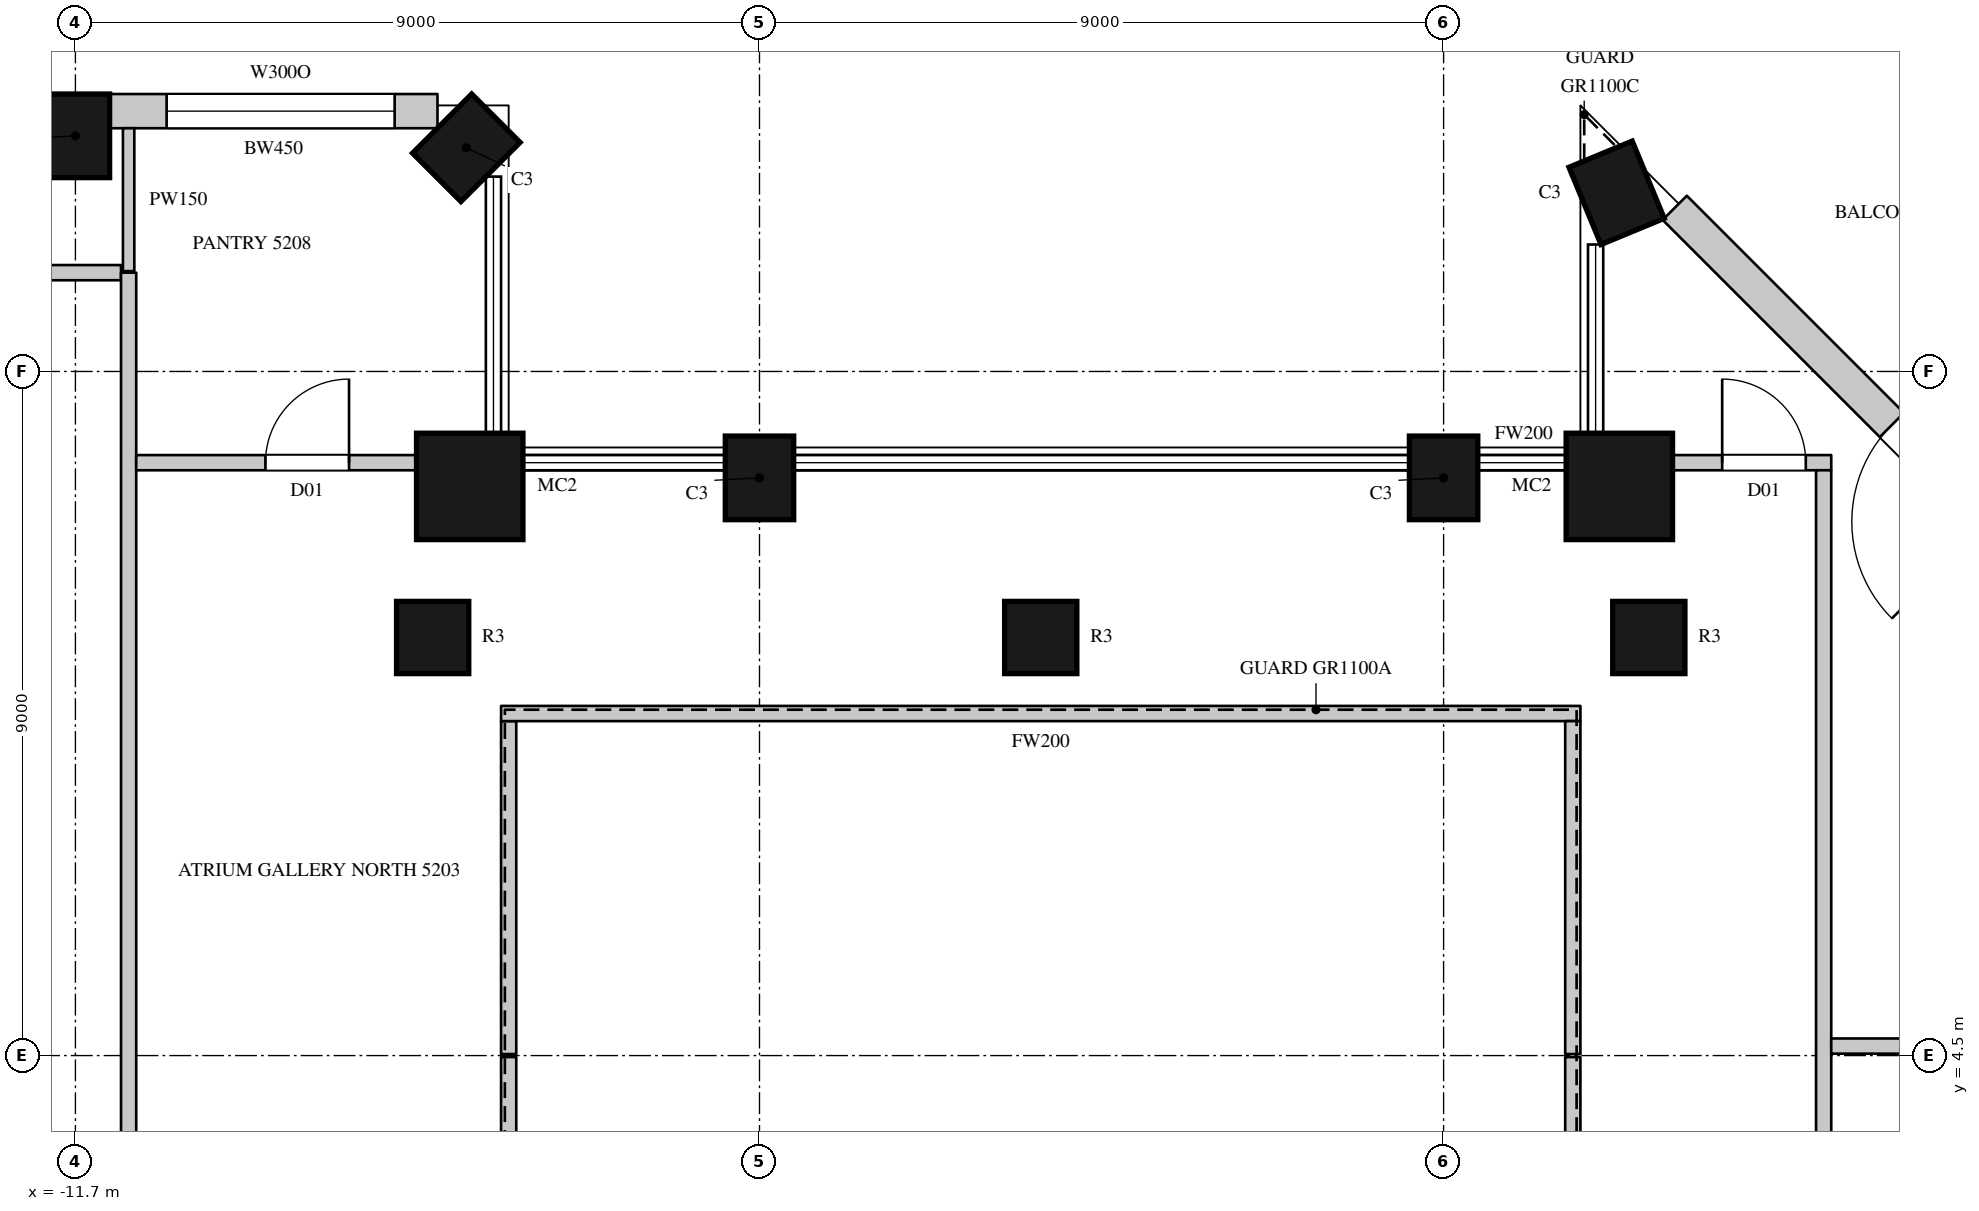
"""IFC4 building model, lengths in metres.
Left out: names, types, materials, properties, quantities, classifications, styles, units other than length and angle.
Written with IfcOpenShell. Run it as: python <this file> out.ifc"""

import sys

from ifc_helpers import new_model, si_unit, direction, frame, frame_2d, origin, origin_2d, place, context, subcontext, project, spatial, rectangle, circle, extrude, element, fill, save


model = new_model("IFC4")
c1 = context("Model", 3, precision=1e-05, world=origin(), true_north=direction((0.0, 1.0)))
c2 = subcontext(c1, "Body", "Model", "MODEL_VIEW")
j1 = project(units=[si_unit("LENGTHUNIT", "METRE"), si_unit("PLANEANGLEUNIT", "RADIAN")], contexts=[c1])
p1 = place(None, origin())
s1 = spatial("IfcSite", under=j1, at=p1, CompositionType="ELEMENT")
p2 = place(p1, origin())
s2 = spatial("IfcBuilding", under=s1, at=p2, CompositionType="ELEMENT")
p3 = place(p2, frame((0.0, 0.0, 234.3)))
s3 = spatial("IfcBuildingStorey", under=s2, at=p3, CompositionType="ELEMENT", Elevation=234.3)
p4 = place(p3, frame((8.576, 15.85, 0.0), z_axis=(0.0, 0.0, 1.0), x_axis=(-0.923879672772, -0.382683093746, 0.0)))
e1 = element("IfcColumn", 1, at=p4, inside=s3, PredefinedType="COLUMN", context=c2, shape_type="SweptSolid", body=[
    extrude(rectangle(XDim=0.9, YDim=1.1, at=origin_2d()), origin(), (0.0, 0.0, 1.0), 4.1),
])
p5 = place(p3, frame((8.612, 11.988, 0.0), z_axis=(0.0, 0.0, 1.0), x_axis=(1.0, 0.0, 0.0)))
e2 = element("IfcColumn", 2, at=p5, inside=s3, PredefinedType="COLUMN", context=c2, shape_type="SweptSolid", body=[
    extrude(circle(Radius=0.7, at=origin_2d()), origin(), (0.0, 0.0, 1.0), 4.1),
])
for number, where, z_axis, x_axis in (
    (3, (6.3, 12.1, 0.0), (0.0, 0.0, 1.0), (-1.0, 0.0, 0.0)),
    (4, (-2.7, 12.1, 0.0), (0.0, 0.0, 1.0), (-1.0, 0.0, 0.0)),
):
    element("IfcColumn", number, at=place(p3, frame(where, z_axis=z_axis, x_axis=x_axis)), inside=s3, PredefinedType="COLUMN", context=c2, shape_type="SweptSolid", body=[
        extrude(rectangle(XDim=0.9, YDim=1.1, at=origin_2d()), origin(), (0.0, 0.0, 1.0), 4.1),
    ])
p6 = place(p3, frame((-6.512, 11.988, 0.0), z_axis=(0.0, 0.0, 1.0), x_axis=(1.0, 0.0, 0.0)))
e5 = element("IfcColumn", 5, at=p6, inside=s3, PredefinedType="COLUMN", context=c2, shape_type="SweptSolid", body=[
    extrude(circle(Radius=0.7, at=origin_2d()), origin(), (0.0, 0.0, 1.0), 4.1),
])
for number, where, z_axis, x_axis in (
    (6, (-6.557, 16.443, 0.0), (0.0, 0.0, 1.0), (-0.707, 0.707, 0.0)),
    (7, (-11.7, 16.6, 0.0), (0.0, 0.0, 1.0), (-1.0, 0.0, 0.0)),
):
    element("IfcColumn", number, at=place(p3, frame(where, z_axis=z_axis, x_axis=x_axis)), inside=s3, PredefinedType="COLUMN", context=c2, shape_type="SweptSolid", body=[
        extrude(rectangle(XDim=0.9, YDim=1.1, at=origin_2d()), origin(), (0.0, 0.0, 1.0), 4.1),
    ])
for number, where, z_axis, x_axis in (
    (8, (-7.0, 10.0, 0.0), (0.0, 0.0, 1.0), (1.0, 0.0, 0.0)),
    (9, (1.0, 10.0, 0.0), (0.0, 0.0, 1.0), (1.0, 0.0, 0.0)),
    (10, (9.0, 10.0, 0.0), (0.0, 0.0, 1.0), (1.0, 0.0, 0.0)),
):
    element("IfcColumn", number, at=place(p3, frame(where, z_axis=z_axis, x_axis=x_axis)), inside=s3, PredefinedType="COLUMN", context=c2, shape_type="SweptSolid", body=[
        extrude(circle(Radius=0.475, at=origin_2d()), origin(), (0.0, 0.0, 1.0), 4.1),
    ])
p7 = place(p3, frame((13.941, 11.053, 0.0), z_axis=(0.0, 0.0, 1.0), x_axis=(-0.707106781187, 0.707106781187, 0.0)))
e11 = element("IfcWall", 11, at=p7, inside=s3, PredefinedType="SOLIDWALL", context=c2, shape_type="SweptSolid", body=[
    extrude(rectangle(XDim=6.505, YDim=0.45, at=frame_2d((3.252, 0.0))), origin(), (0.0, 0.0, 1.0), 3.8),
])
p8 = place(p7, frame((0.665, 0.0, 0.0)))
e12 = element("IfcOpeningElement", 12, at=p8, cuts=e11, PredefinedType="OPENING", context=c2, shape_type="SweptSolid", body=[
    extrude(rectangle(XDim=1.8, YDim=2.4, at=frame_2d((0.9, 1.2))), frame((0.0, 0.235, 0.0), z_axis=(0.0, -1.0, 0.0), x_axis=(1.0, 0.0, 0.0)), (0.0, 0.0, 1.0), 0.47),
])
p9 = place(p3, frame((-6.936, 16.925, 0.0), z_axis=(0.0, 0.0, 1.0), x_axis=(-1.0, 0.0, 0.0)))
e13 = element("IfcWall", 13, at=p9, inside=s3, PredefinedType="SOLIDWALL", context=c2, shape_type="SweptSolid", body=[
    extrude(rectangle(XDim=4.314, YDim=0.45, at=frame_2d((2.157, 0.0))), origin(), (0.0, 0.0, 1.0), 3.8),
])
p10 = place(p9, frame((0.564, 0.0, 1.05)))
e14 = element("IfcOpeningElement", 14, at=p10, cuts=e13, PredefinedType="OPENING", context=c2, shape_type="SweptSolid", body=[
    extrude(rectangle(XDim=3.0, YDim=2.4, at=frame_2d((1.5, 1.2))), frame((0.0, 0.235, 0.0), z_axis=(0.0, -1.0, 0.0), x_axis=(1.0, 0.0, 0.0)), (0.0, 0.0, 1.0), 0.47),
])
p11 = place(p3, frame((12.251, 14.263, 0.0), z_axis=(0.0, 0.0, 1.0), x_axis=(-0.707039709166, 0.707173846846, 0.0)))
e15 = element("IfcWall", 15, at=p11, inside=s3, PredefinedType="SOLIDWALL", context=c2, shape_type="SweptSolid", body=[
    extrude(rectangle(XDim=1.82, YDim=0.45, at=frame_2d((0.91, 0.0))), origin(), (0.0, 0.0, 1.0), 0.6),
])
p12 = place(p3, frame((-13.97, 14.8, 0.0), z_axis=(0.0, 0.0, 1.0), x_axis=(1.0, 0.0, 0.0)))
e16 = element("IfcWall", 16, at=p12, inside=s3, PredefinedType="PARTITIONING", context=c2, shape_type="SweptSolid", body=[
    extrude(rectangle(XDim=2.87, YDim=0.2, at=frame_2d((1.435, 0.0))), origin(), (0.0, 0.0, 1.0), 3.8),
])
p13 = place(p3, frame((-11.0, -14.8, 0.0), z_axis=(0.0, 0.0, 1.0), x_axis=(0.0, 1.0, 0.0)))
e17 = element("IfcWall", 17, at=p13, inside=s3, PredefinedType="PARTITIONING", context=c2, shape_type="SweptSolid", body=[
    extrude(rectangle(XDim=29.6, YDim=0.2, at=frame_2d((14.8, 0.0))), origin(), (0.0, 0.0, 1.0), 3.8),
])
p14 = place(p13, frame((10.15, 0.0, 0.0)))
e18 = element("IfcOpeningElement", 18, at=p14, cuts=e17, PredefinedType="OPENING", context=c2, shape_type="SweptSolid", body=[
    extrude(rectangle(XDim=1.5, YDim=2.4, at=frame_2d((0.75, 1.2))), frame((0.0, 0.11, 0.0), z_axis=(0.0, -1.0, 0.0), x_axis=(1.0, 0.0, 0.0)), (0.0, 0.0, 1.0), 0.22),
])
p15 = place(p3, frame((-10.9, 12.3, 0.0), z_axis=(0.0, 0.0, 1.0), x_axis=(1.0, 0.0, 0.0)))
e19 = element("IfcWall", 19, at=p15, inside=s3, PredefinedType="PARTITIONING", context=c2, shape_type="SweptSolid", body=[
    extrude(rectangle(XDim=3.735, YDim=0.2, at=frame_2d((1.867, 0.0))), origin(), (0.0, 0.0, 1.0), 3.8),
])
p16 = place(p15, frame((1.7, 0.0, 0.0)))
e20 = element("IfcOpeningElement", 20, at=p16, cuts=e19, PredefinedType="OPENING", context=c2, shape_type="SweptSolid", body=[
    extrude(rectangle(XDim=1.1, YDim=2.4, at=frame_2d((0.55, 1.2))), frame((0.0, 0.11, 0.0), z_axis=(0.0, -1.0, 0.0), x_axis=(1.0, 0.0, 0.0)), (0.0, 0.0, 1.0), 0.22),
])
p17 = place(p3, frame((-5.859, 12.3, 0.0), z_axis=(0.0, 0.0, 1.0), x_axis=(1.0, 0.0, 0.0)))
e21 = element("IfcWall", 21, at=p17, inside=s3, PredefinedType="PARTITIONING", context=c2, shape_type="SweptSolid", body=[
    extrude(rectangle(XDim=2.709, YDim=0.2, at=frame_2d((1.354, 0.0))), origin(), (0.0, 0.0, 1.0), 3.8),
])
p18 = place(p3, frame((-2.25, 12.3, 0.0), z_axis=(0.0, 0.0, 1.0), x_axis=(1.0, 0.0, 0.0)))
e22 = element("IfcWall", 22, at=p18, inside=s3, PredefinedType="PARTITIONING", context=c2, shape_type="SweptSolid", body=[
    extrude(rectangle(XDim=8.1, YDim=0.2, at=frame_2d((4.05, 0.0))), origin(), (0.0, 0.0, 1.0), 3.8),
])
p19 = place(p3, frame((6.75, 12.3, 0.0), z_axis=(0.0, 0.0, 1.0), x_axis=(1.0, 0.0, 0.0)))
e23 = element("IfcWall", 23, at=p19, inside=s3, PredefinedType="PARTITIONING", context=c2, shape_type="SweptSolid", body=[
    extrude(rectangle(XDim=1.209, YDim=0.2, at=frame_2d((0.604, 0.0))), origin(), (0.0, 0.0, 1.0), 3.8),
])
p20 = place(p3, frame((-6.0, -8.9, 0.0), z_axis=(0.0, 0.0, 1.0), x_axis=(0.0, 1.0, 0.0)))
e24 = element("IfcWall", 24, at=p20, inside=s3, PredefinedType="PARTITIONING", context=c2, shape_type="SweptSolid", body=[
    extrude(rectangle(XDim=13.38, YDim=0.2, at=frame_2d((6.69, 0.0))), origin(), (0.0, 0.0, 1.0), 3.8),
])
p21 = place(p3, frame((-6.0, 4.52, 0.0), z_axis=(0.0, 0.0, 1.0), x_axis=(0.0, 1.0, 0.0)))
e25 = element("IfcWall", 25, at=p21, inside=s3, PredefinedType="PARTITIONING", context=c2, shape_type="SweptSolid", body=[
    extrude(rectangle(XDim=4.38, YDim=0.2, at=frame_2d((2.19, 0.0))), origin(), (0.0, 0.0, 1.0), 3.8),
])
p22 = place(p3, frame((-6.1, 9.0, 0.0), z_axis=(0.0, 0.0, 1.0), x_axis=(1.0, 0.0, 0.0)))
e26 = element("IfcWall", 26, at=p22, inside=s3, PredefinedType="PARTITIONING", context=c2, shape_type="SweptSolid", body=[
    extrude(rectangle(XDim=14.2, YDim=0.2, at=frame_2d((7.1, 0.0))), origin(), (0.0, 0.0, 1.0), 3.8),
])
p23 = place(p3, frame((8.0, -8.9, 0.0), z_axis=(0.0, 0.0, 1.0), x_axis=(0.0, 1.0, 0.0)))
e27 = element("IfcWall", 27, at=p23, inside=s3, PredefinedType="PARTITIONING", context=c2, shape_type="SweptSolid", body=[
    extrude(rectangle(XDim=13.38, YDim=0.2, at=frame_2d((6.69, 0.0))), origin(), (0.0, 0.0, 1.0), 3.8),
])
p24 = place(p3, frame((8.0, 4.52, 0.0), z_axis=(0.0, 0.0, 1.0), x_axis=(0.0, 1.0, 0.0)))
e28 = element("IfcWall", 28, at=p24, inside=s3, PredefinedType="PARTITIONING", context=c2, shape_type="SweptSolid", body=[
    extrude(rectangle(XDim=4.38, YDim=0.2, at=frame_2d((2.19, 0.0))), origin(), (0.0, 0.0, 1.0), 3.8),
])
p25 = place(p3, frame((9.265, 12.3, 0.0), z_axis=(0.0, 0.0, 1.0), x_axis=(1.0, 0.0, 0.0)))
e29 = element("IfcWall", 29, at=p25, inside=s3, PredefinedType="PARTITIONING", context=c2, shape_type="SweptSolid", body=[
    extrude(rectangle(XDim=2.135, YDim=0.2, at=frame_2d((1.067, 0.0))), origin(), (0.0, 0.0, 1.0), 3.8),
])
p26 = place(p25, frame((0.7, 0.0, 0.0)))
e30 = element("IfcOpeningElement", 30, at=p26, cuts=e29, PredefinedType="OPENING", context=c2, shape_type="SweptSolid", body=[
    extrude(rectangle(XDim=1.1, YDim=2.4, at=frame_2d((0.55, 1.2))), frame((0.0, 0.11, 0.0), z_axis=(0.0, -1.0, 0.0), x_axis=(1.0, 0.0, 0.0)), (0.0, 0.0, 1.0), 0.22),
])
p27 = place(p3, frame((11.3, -12.3, 0.0), z_axis=(0.0, 0.0, 1.0), x_axis=(0.0, 1.0, 0.0)))
e31 = element("IfcWall", 31, at=p27, inside=s3, PredefinedType="PARTITIONING", context=c2, shape_type="SweptSolid", body=[
    extrude(rectangle(XDim=24.5, YDim=0.2, at=frame_2d((12.25, 0.0))), origin(), (0.0, 0.0, 1.0), 3.8),
])
p28 = place(p27, frame((10.15, 0.0, 0.0)))
e32 = element("IfcOpeningElement", 32, at=p28, cuts=e31, PredefinedType="OPENING", context=c2, shape_type="SweptSolid", body=[
    extrude(rectangle(XDim=1.5, YDim=2.4, at=frame_2d((0.75, 1.2))), frame((0.0, 0.11, 0.0), z_axis=(0.0, -1.0, 0.0), x_axis=(1.0, 0.0, 0.0)), (0.0, 0.0, 1.0), 0.22),
])
p29 = place(p27, frame((3.3, 0.0, 0.0)))
e33 = element("IfcOpeningElement", 33, at=p29, cuts=e31, PredefinedType="OPENING", context=c2, shape_type="SweptSolid", body=[
    extrude(rectangle(XDim=1.1, YDim=2.4, at=frame_2d((0.55, 1.2))), frame((0.0, 0.11, 0.0), z_axis=(0.0, -1.0, 0.0), x_axis=(1.0, 0.0, 0.0)), (0.0, 0.0, 1.0), 0.22),
])
p30 = place(p3, frame((11.4, 4.625, 0.0), z_axis=(0.0, 0.0, 1.0), x_axis=(1.0, 0.0, 0.0)))
e34 = element("IfcWall", 34, at=p30, inside=s3, PredefinedType="PARTITIONING", context=c2, shape_type="SweptSolid", body=[
    extrude(rectangle(XDim=3.275, YDim=0.2, at=frame_2d((1.638, 0.0))), origin(), (0.0, 0.0, 1.0), 3.8),
])
p31 = place(p3, frame((-11.0, 14.82, 0.0), z_axis=(0.0, 0.0, 1.0), x_axis=(0.0, 1.0, 0.0)))
e35 = element("IfcWall", 35, at=p31, inside=s3, PredefinedType="PARTITIONING", context=c2, shape_type="SweptSolid", body=[
    extrude(rectangle(XDim=1.88, YDim=0.15, at=frame_2d((0.94, 0.0))), origin(), (0.0, 0.0, 1.0), 3.8),
])
p32 = place(p8, origin())
e36 = element("IfcDoor", 36, at=p32, inside=s3, OperationType="SLIDING_TO_LEFT", PredefinedType="DOOR", context=c2, shape_type="SweptSolid", body=[
    extrude(rectangle(XDim=1.8, YDim=2.4, at=frame_2d((0.9, 1.2))), frame((0.0, 0.13, 0.0), z_axis=(0.0, -1.0, 0.0), x_axis=(1.0, 0.0, 0.0)), (0.0, 0.0, 1.0), 0.05),
])
fill(e12, e36)
p33 = place(p10, origin())
e37 = element("IfcWindow", 37, at=p33, inside=s3, PartitioningType="SINGLE_PANEL", PredefinedType="WINDOW", context=c2, shape_type="SweptSolid", body=[
    extrude(rectangle(XDim=3.0, YDim=2.4, at=frame_2d((1.5, 1.2))), frame((0.0, 0.135, 0.0), z_axis=(0.0, -1.0, 0.0), x_axis=(1.0, 0.0, 0.0)), (0.0, 0.0, 1.0), 0.06),
])
fill(e14, e37)
p34 = place(p16, origin())
e38 = element("IfcDoor", 38, at=p34, inside=s3, OperationType="SINGLE_SWING_RIGHT", PredefinedType="DOOR", context=c2, shape_type="SweptSolid", body=[
    extrude(rectangle(XDim=1.1, YDim=2.4, at=frame_2d((0.55, 1.2))), frame((0.0, 0.025, 0.0), z_axis=(0.0, -1.0, 0.0), x_axis=(1.0, 0.0, 0.0)), (0.0, 0.0, 1.0), 0.05),
])
fill(e20, e38)
p35 = place(p26, origin())
e39 = element("IfcDoor", 39, at=p35, inside=s3, OperationType="SINGLE_SWING_LEFT", PredefinedType="DOOR", context=c2, shape_type="SweptSolid", body=[
    extrude(rectangle(XDim=1.1, YDim=2.4, at=frame_2d((0.55, 1.2))), frame((0.0, 0.025, 0.0), z_axis=(0.0, -1.0, 0.0), x_axis=(1.0, 0.0, 0.0)), (0.0, 0.0, 1.0), 0.05),
])
fill(e30, e39)
save(model, sys.argv[1])
